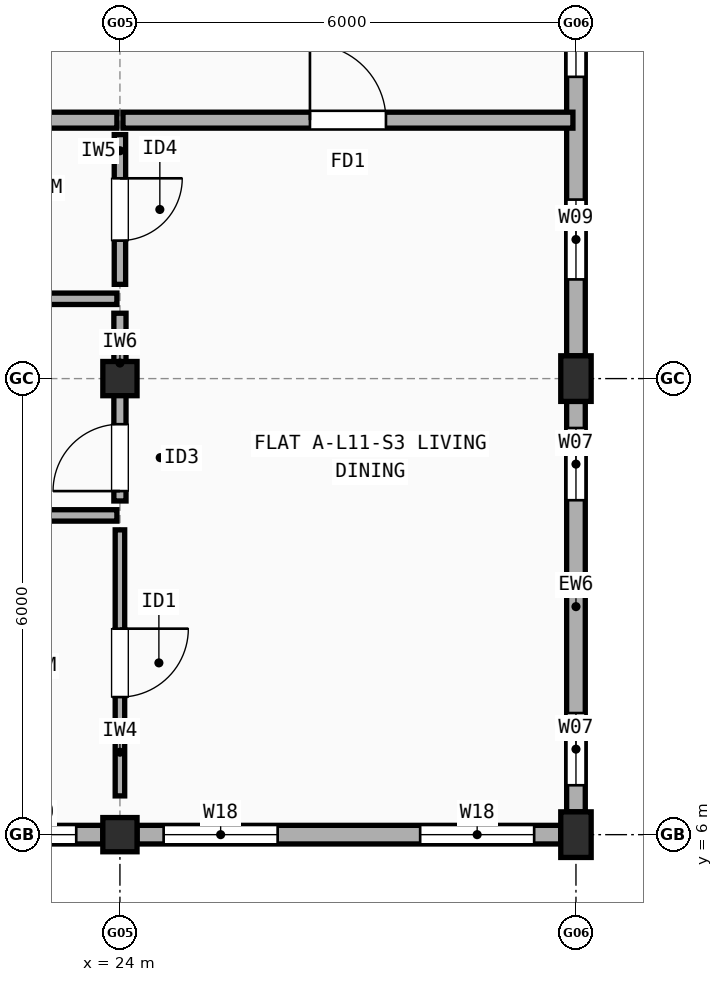
"""IFC4 building model, lengths in metres.
Left out: names, types, materials, properties, quantities, classifications, styles, units other than length and angle.
Written with IfcOpenShell. Run it as: python <this file> out.ifc"""

import sys

from ifc_helpers import new_model, si_unit, direction, frame, frame_2d, origin, origin_2d, place, context, subcontext, project, spatial, rectangle, extrude, element, fill, save


model = new_model("IFC4")
c1 = context("Model", 3, precision=1e-05, world=origin(), true_north=direction((0.0, 1.0)))
c2 = subcontext(c1, "Body", "Model", "MODEL_VIEW")
j1 = project(units=[si_unit("LENGTHUNIT", "METRE"), si_unit("PLANEANGLEUNIT", "RADIAN")], contexts=[c1])
p1 = place(None, origin())
s1 = spatial("IfcSite", under=j1, at=p1, CompositionType="ELEMENT")
p2 = place(p1, origin())
s2 = spatial("IfcBuilding", under=s1, at=p2, CompositionType="ELEMENT")
p3 = place(p2, frame((0.0, 0.0, 36.5)))
s3 = spatial("IfcBuildingStorey", under=s2, at=p3, CompositionType="ELEMENT", Elevation=36.5)
for number, where, z_axis, x_axis in (
    (1, (24.0, 6.0, 0.0), (0.0, 0.0, 1.0), (1.0, 0.0, 0.0)),
    (2, (24.0, 12.0, 0.0), (0.0, 0.0, 1.0), (1.0, 0.0, 0.0)),
):
    element("IfcColumn", number, at=place(p3, frame(where, z_axis=z_axis, x_axis=x_axis)), inside=s3, PredefinedType="COLUMN", context=c2, shape_type="SweptSolid", body=[
        extrude(rectangle(XDim=0.45, YDim=0.45, at=origin_2d()), origin(), (0.0, 0.0, 1.0), 2.995),
    ])
for number, where, z_axis, x_axis in (
    (3, (30.0, 6.0, 0.0), (0.0, 0.0, 1.0), (1.0, 0.0, 0.0)),
    (4, (30.0, 12.0, 0.0), (0.0, 0.0, 1.0), (1.0, 0.0, 0.0)),
):
    element("IfcColumn", number, at=place(p3, frame(where, z_axis=z_axis, x_axis=x_axis)), inside=s3, PredefinedType="COLUMN", context=c2, shape_type="SweptSolid", body=[
        extrude(rectangle(XDim=0.4, YDim=0.6, at=origin_2d()), origin(), (0.0, 0.0, 1.0), 2.995),
    ])
p4 = place(p3, frame((18.225, 6.0, 0.0), z_axis=(0.0, 0.0, 1.0), x_axis=(1.0, 0.0, 0.0)))
e5 = element("IfcWall", 5, at=p4, inside=s3, PredefinedType="STANDARD", context=c2, shape_type="SweptSolid", body=[
    extrude(rectangle(XDim=5.55, YDim=0.245, at=frame_2d((2.775, 0.0))), origin(), (0.0, 0.0, 1.0), 2.477),
])
p5 = place(p4, frame((1.665, 0.0, 0.9)))
e6 = element("IfcOpeningElement", 6, at=p5, cuts=e5, PredefinedType="OPENING", context=c2, shape_type="SweptSolid", body=[
    extrude(rectangle(XDim=1.05, YDim=1.35, at=frame_2d((0.525, 0.675))), frame((0.0, 0.133, 0.0), z_axis=(0.0, -1.0, 0.0), x_axis=(1.0, 0.0, 0.0)), (0.0, 0.0, 1.0), 0.265),
])
p6 = place(p4, frame((4.15, 0.0, 0.9)))
e7 = element("IfcOpeningElement", 7, at=p6, cuts=e5, PredefinedType="OPENING", context=c2, shape_type="SweptSolid", body=[
    extrude(rectangle(XDim=1.05, YDim=1.35, at=frame_2d((0.525, 0.675))), frame((0.0, 0.133, 0.0), z_axis=(0.0, -1.0, 0.0), x_axis=(1.0, 0.0, 0.0)), (0.0, 0.0, 1.0), 0.265),
])
p7 = place(p3, frame((24.225, 6.0, 0.0), z_axis=(0.0, 0.0, 1.0), x_axis=(1.0, 0.0, 0.0)))
e8 = element("IfcWall", 8, at=p7, inside=s3, PredefinedType="STANDARD", context=c2, shape_type="SweptSolid", body=[
    extrude(rectangle(XDim=5.575, YDim=0.245, at=frame_2d((2.788, 0.0))), origin(), (0.0, 0.0, 1.0), 2.477),
])
p8 = place(p7, frame((0.35, 0.0, 0.9)))
e9 = element("IfcOpeningElement", 9, at=p8, cuts=e8, PredefinedType="OPENING", context=c2, shape_type="SweptSolid", body=[
    extrude(rectangle(XDim=1.5, YDim=1.4, at=frame_2d((0.75, 0.7))), frame((0.0, 0.133, 0.0), z_axis=(0.0, -1.0, 0.0), x_axis=(1.0, 0.0, 0.0)), (0.0, 0.0, 1.0), 0.265),
])
p9 = place(p7, frame((3.725, 0.0, 0.9)))
e10 = element("IfcOpeningElement", 10, at=p9, cuts=e8, PredefinedType="OPENING", context=c2, shape_type="SweptSolid", body=[
    extrude(rectangle(XDim=1.5, YDim=1.4, at=frame_2d((0.75, 0.7))), frame((0.0, 0.133, 0.0), z_axis=(0.0, -1.0, 0.0), x_axis=(1.0, 0.0, 0.0)), (0.0, 0.0, 1.0), 0.265),
])
p10 = place(p3, frame((30.0, 6.3, 0.0), z_axis=(0.0, 0.0, 1.0), x_axis=(0.0, 1.0, 0.0)))
e11 = element("IfcWall", 11, at=p10, inside=s3, PredefinedType="STANDARD", context=c2, shape_type="SweptSolid", body=[
    extrude(rectangle(XDim=5.4, YDim=0.245, at=frame_2d((2.7, 0.0))), origin(), (0.0, 0.0, 1.0), 2.477),
])
p11 = place(p10, frame((0.35, 0.0, 0.9)))
e12 = element("IfcOpeningElement", 12, at=p11, cuts=e11, PredefinedType="OPENING", context=c2, shape_type="SweptSolid", body=[
    extrude(rectangle(XDim=0.95, YDim=1.35, at=frame_2d((0.475, 0.675))), frame((0.0, 0.133, 0.0), z_axis=(0.0, -1.0, 0.0), x_axis=(1.0, 0.0, 0.0)), (0.0, 0.0, 1.0), 0.265),
])
p12 = place(p10, frame((4.1, 0.0, 0.9)))
e13 = element("IfcOpeningElement", 13, at=p12, cuts=e11, PredefinedType="OPENING", context=c2, shape_type="SweptSolid", body=[
    extrude(rectangle(XDim=0.95, YDim=1.35, at=frame_2d((0.475, 0.675))), frame((0.0, 0.133, 0.0), z_axis=(0.0, -1.0, 0.0), x_axis=(1.0, 0.0, 0.0)), (0.0, 0.0, 1.0), 0.265),
])
p13 = place(p3, frame((30.0, 12.3, 0.0), z_axis=(0.0, 0.0, 1.0), x_axis=(0.0, 1.0, 0.0)))
e14 = element("IfcWall", 14, at=p13, inside=s3, PredefinedType="STANDARD", context=c2, shape_type="SweptSolid", body=[
    extrude(rectangle(XDim=5.4, YDim=0.245, at=frame_2d((2.7, 0.0))), origin(), (0.0, 0.0, 1.0), 2.477),
])
p14 = place(p13, frame((1.005, 0.0, 0.9)))
e15 = element("IfcOpeningElement", 15, at=p14, cuts=e14, PredefinedType="OPENING", context=c2, shape_type="SweptSolid", body=[
    extrude(rectangle(XDim=1.05, YDim=1.35, at=frame_2d((0.525, 0.675))), frame((0.0, 0.133, 0.0), z_axis=(0.0, -1.0, 0.0), x_axis=(1.0, 0.0, 0.0)), (0.0, 0.0, 1.0), 0.265),
])
p15 = place(p13, frame((3.67, 0.0, 0.9)))
e16 = element("IfcOpeningElement", 16, at=p15, cuts=e14, PredefinedType="OPENING", context=c2, shape_type="SweptSolid", body=[
    extrude(rectangle(XDim=1.2, YDim=1.35, at=frame_2d((0.6, 0.675))), frame((0.0, 0.133, 0.0), z_axis=(0.0, -1.0, 0.0), x_axis=(1.0, 0.0, 0.0)), (0.0, 0.0, 1.0), 0.265),
])
p16 = place(p3, frame((19.54, 15.4, 0.0), z_axis=(0.0, 0.0, 1.0), x_axis=(1.0, 0.0, 0.0)))
e17 = element("IfcWall", 17, at=p16, inside=s3, PredefinedType="SOLIDWALL", context=c2, shape_type="SweptSolid", body=[
    extrude(rectangle(XDim=4.42, YDim=0.21, at=frame_2d((2.21, 0.0))), origin(), (0.0, 0.0, 1.0), 2.548),
])
p17 = place(p3, frame((24.04, 15.4, 0.0), z_axis=(0.0, 0.0, 1.0), x_axis=(1.0, 0.0, 0.0)))
e18 = element("IfcWall", 18, at=p17, inside=s3, PredefinedType="SOLIDWALL", context=c2, shape_type="SweptSolid", body=[
    extrude(rectangle(XDim=5.92, YDim=0.21, at=frame_2d((2.96, 0.0))), origin(), (0.0, 0.0, 1.0), 2.477),
])
p18 = place(p17, frame((2.46, 0.0, 0.0)))
e19 = element("IfcOpeningElement", 19, at=p18, cuts=e18, PredefinedType="OPENING", context=c2, shape_type="SweptSolid", body=[
    extrude(rectangle(XDim=1.0, YDim=2.15, at=frame_2d((0.5, 1.075))), frame((0.0, 0.115, 0.0), z_axis=(0.0, -1.0, 0.0), x_axis=(1.0, 0.0, 0.0)), (0.0, 0.0, 1.0), 0.23),
])
p19 = place(p3, frame((24.0, 6.51, 0.0), z_axis=(0.0, 0.0, 1.0), x_axis=(0.0, 1.0, 0.0)))
e20 = element("IfcWall", 20, at=p19, inside=s3, PredefinedType="PARTITIONING", context=c2, shape_type="SweptSolid", body=[
    extrude(rectangle(XDim=3.5, YDim=0.125, at=frame_2d((1.75, 0.0))), origin(), (0.0, 0.0, 1.0), 2.458),
])
p20 = place(p19, frame((1.3, 0.0, 0.0)))
e21 = element("IfcOpeningElement", 21, at=p20, cuts=e20, PredefinedType="OPENING", context=c2, shape_type="SweptSolid", body=[
    extrude(rectangle(XDim=0.9, YDim=2.1, at=frame_2d((0.45, 1.05))), frame((0.0, 0.073, 0.0), z_axis=(0.0, -1.0, 0.0), x_axis=(1.0, 0.0, 0.0)), (0.0, 0.0, 1.0), 0.145),
])
p21 = place(p3, frame((24.0, 10.39, 0.0), z_axis=(0.0, 0.0, 1.0), x_axis=(0.0, 1.0, 0.0)))
e22 = element("IfcWall", 22, at=p21, inside=s3, PredefinedType="PLUMBINGWALL", context=c2, shape_type="SweptSolid", body=[
    extrude(rectangle(XDim=2.47, YDim=0.16, at=frame_2d((1.235, 0.0))), origin(), (0.0, 0.0, 1.0), 2.458),
])
p22 = place(p21, frame((0.13, 0.0, 0.0)))
e23 = element("IfcOpeningElement", 23, at=p22, cuts=e22, PredefinedType="OPENING", context=c2, shape_type="SweptSolid", body=[
    extrude(rectangle(XDim=0.88, YDim=2.1, at=frame_2d((0.44, 1.05))), frame((0.0, 0.09, 0.0), z_axis=(0.0, -1.0, 0.0), x_axis=(1.0, 0.0, 0.0)), (0.0, 0.0, 1.0), 0.18),
])
p23 = place(p3, frame((24.0, 13.24, 0.0), z_axis=(0.0, 0.0, 1.0), x_axis=(0.0, 1.0, 0.0)))
e24 = element("IfcWall", 24, at=p23, inside=s3, PredefinedType="PARTITIONING", context=c2, shape_type="SweptSolid", body=[
    extrude(rectangle(XDim=1.97, YDim=0.15, at=frame_2d((0.985, 0.0))), origin(), (0.0, 0.0, 1.0), 2.548),
])
p24 = place(p23, frame((0.575, 0.0, 0.0)))
e25 = element("IfcOpeningElement", 25, at=p24, cuts=e24, PredefinedType="OPENING", context=c2, shape_type="SweptSolid", body=[
    extrude(rectangle(XDim=0.82, YDim=2.08, at=frame_2d((0.41, 1.04))), frame((0.0, 0.085, 0.0), z_axis=(0.0, -1.0, 0.0), x_axis=(1.0, 0.0, 0.0)), (0.0, 0.0, 1.0), 0.17),
])
p25 = place(p3, frame((19.54, 10.2, 0.0), z_axis=(0.0, 0.0, 1.0), x_axis=(1.0, 0.0, 0.0)))
e26 = element("IfcWall", 26, at=p25, inside=s3, PredefinedType="PARTITIONING", context=c2, shape_type="SweptSolid", body=[
    extrude(rectangle(XDim=4.42, YDim=0.15, at=frame_2d((2.21, 0.0))), origin(), (0.0, 0.0, 1.0), 2.458),
])
p26 = place(p3, frame((19.54, 13.05, 0.0), z_axis=(0.0, 0.0, 1.0), x_axis=(1.0, 0.0, 0.0)))
e27 = element("IfcWall", 27, at=p26, inside=s3, PredefinedType="PARTITIONING", context=c2, shape_type="SweptSolid", body=[
    extrude(rectangle(XDim=4.42, YDim=0.15, at=frame_2d((2.21, 0.0))), origin(), (0.0, 0.0, 1.0), 2.548),
])
p27 = place(p6, origin())
e28 = element("IfcWindow", 28, at=p27, inside=s3, PartitioningType="SINGLE_PANEL", PredefinedType="WINDOW", context=c2, shape_type="SweptSolid", body=[
    extrude(rectangle(XDim=1.05, YDim=1.35, at=frame_2d((0.525, 0.675))), frame((0.0, 0.03, 0.0), z_axis=(0.0, -1.0, 0.0), x_axis=(1.0, 0.0, 0.0)), (0.0, 0.0, 1.0), 0.06),
])
fill(e7, e28)
p28 = place(p8, origin())
e29 = element("IfcWindow", 29, at=p28, inside=s3, PartitioningType="SINGLE_PANEL", PredefinedType="WINDOW", context=c2, shape_type="SweptSolid", body=[
    extrude(rectangle(XDim=1.5, YDim=1.4, at=frame_2d((0.75, 0.7))), frame((0.0, 0.03, 0.0), z_axis=(0.0, -1.0, 0.0), x_axis=(1.0, 0.0, 0.0)), (0.0, 0.0, 1.0), 0.06),
])
fill(e9, e29)
p29 = place(p9, origin())
e30 = element("IfcWindow", 30, at=p29, inside=s3, PartitioningType="SINGLE_PANEL", PredefinedType="WINDOW", context=c2, shape_type="SweptSolid", body=[
    extrude(rectangle(XDim=1.5, YDim=1.4, at=frame_2d((0.75, 0.7))), frame((0.0, 0.03, 0.0), z_axis=(0.0, -1.0, 0.0), x_axis=(1.0, 0.0, 0.0)), (0.0, 0.0, 1.0), 0.06),
])
fill(e10, e30)
p30 = place(p11, origin())
e31 = element("IfcWindow", 31, at=p30, inside=s3, PartitioningType="SINGLE_PANEL", PredefinedType="WINDOW", context=c2, shape_type="SweptSolid", body=[
    extrude(rectangle(XDim=0.95, YDim=1.35, at=frame_2d((0.475, 0.675))), frame((0.0, 0.03, 0.0), z_axis=(0.0, -1.0, 0.0), x_axis=(1.0, 0.0, 0.0)), (0.0, 0.0, 1.0), 0.06),
])
fill(e12, e31)
p31 = place(p12, origin())
e32 = element("IfcWindow", 32, at=p31, inside=s3, PartitioningType="SINGLE_PANEL", PredefinedType="WINDOW", context=c2, shape_type="SweptSolid", body=[
    extrude(rectangle(XDim=0.95, YDim=1.35, at=frame_2d((0.475, 0.675))), frame((0.0, 0.03, 0.0), z_axis=(0.0, -1.0, 0.0), x_axis=(1.0, 0.0, 0.0)), (0.0, 0.0, 1.0), 0.06),
])
fill(e13, e32)
p32 = place(p14, origin())
e33 = element("IfcWindow", 33, at=p32, inside=s3, PartitioningType="SINGLE_PANEL", PredefinedType="WINDOW", context=c2, shape_type="SweptSolid", body=[
    extrude(rectangle(XDim=1.05, YDim=1.35, at=frame_2d((0.525, 0.675))), frame((0.0, 0.03, 0.0), z_axis=(0.0, -1.0, 0.0), x_axis=(1.0, 0.0, 0.0)), (0.0, 0.0, 1.0), 0.06),
])
fill(e15, e33)
p33 = place(p15, origin())
e34 = element("IfcWindow", 34, at=p33, inside=s3, PartitioningType="SINGLE_PANEL", PredefinedType="WINDOW", context=c2, shape_type="SweptSolid", body=[
    extrude(rectangle(XDim=1.2, YDim=1.35, at=frame_2d((0.6, 0.675))), frame((0.0, 0.03, 0.0), z_axis=(0.0, -1.0, 0.0), x_axis=(1.0, 0.0, 0.0)), (0.0, 0.0, 1.0), 0.06),
])
fill(e16, e34)
p34 = place(p18, origin())
e35 = element("IfcDoor", 35, at=p34, inside=s3, OperationType="SINGLE_SWING_LEFT", PredefinedType="DOOR", context=c2, shape_type="SweptSolid", body=[
    extrude(rectangle(XDim=1.0, YDim=2.15, at=frame_2d((0.5, 1.075))), frame((0.0, 0.025, 0.0), z_axis=(0.0, -1.0, 0.0), x_axis=(1.0, 0.0, 0.0)), (0.0, 0.0, 1.0), 0.05),
])
fill(e19, e35)
p35 = place(p20, origin())
e36 = element("IfcDoor", 36, at=p35, inside=s3, OperationType="SINGLE_SWING_RIGHT", PredefinedType="DOOR", context=c2, shape_type="SweptSolid", body=[
    extrude(rectangle(XDim=0.9, YDim=2.1, at=frame_2d((0.45, 1.05))), frame((0.0, 0.025, 0.0), z_axis=(0.0, -1.0, 0.0), x_axis=(1.0, 0.0, 0.0)), (0.0, 0.0, 1.0), 0.05),
])
fill(e21, e36)
p36 = place(p22, origin())
e37 = element("IfcDoor", 37, at=p36, inside=s3, OperationType="SINGLE_SWING_LEFT", PredefinedType="DOOR", context=c2, shape_type="SweptSolid", body=[
    extrude(rectangle(XDim=0.88, YDim=2.1, at=frame_2d((0.44, 1.05))), frame((0.0, 0.025, 0.0), z_axis=(0.0, -1.0, 0.0), x_axis=(1.0, 0.0, 0.0)), (0.0, 0.0, 1.0), 0.05),
])
fill(e23, e37)
p37 = place(p24, origin())
e38 = element("IfcDoor", 38, at=p37, inside=s3, OperationType="SINGLE_SWING_RIGHT", PredefinedType="DOOR", context=c2, shape_type="SweptSolid", body=[
    extrude(rectangle(XDim=0.82, YDim=2.08, at=frame_2d((0.41, 1.04))), frame((0.0, 0.025, 0.0), z_axis=(0.0, -1.0, 0.0), x_axis=(1.0, 0.0, 0.0)), (0.0, 0.0, 1.0), 0.05),
])
fill(e25, e38)
save(model, sys.argv[1])
